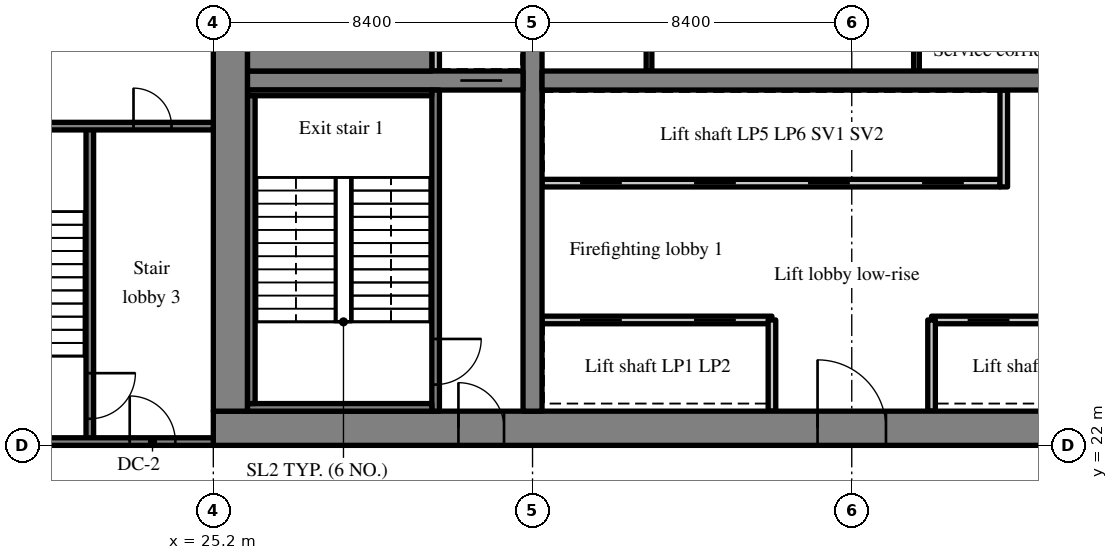
"""IFC4 building model, lengths in metres.
Left out: names, types, materials, properties, quantities, classifications, styles, units other than length and angle.
Written with IfcOpenShell. Run it as: python <this file> out.ifc"""

import sys

from ifc_helpers import new_model, si_unit, direction, frame, frame_2d, origin, place, context, subcontext, project, spatial, rectangle, extrude, source, transform, mapped, element, fill, save


model = new_model("IFC4")
c1 = context("Model", 3, precision=1e-05, world=origin(), true_north=direction((0.0, 1.0)))
c2 = subcontext(c1, "Body", "Model", "MODEL_VIEW")
j1 = project(units=[si_unit("LENGTHUNIT", "METRE"), si_unit("PLANEANGLEUNIT", "RADIAN")], contexts=[c1])
p1 = place(None, origin())
s1 = spatial("IfcSite", under=j1, at=p1, CompositionType="ELEMENT")
p2 = place(p1, origin())
s2 = spatial("IfcBuilding", under=s1, at=p2, CompositionType="ELEMENT")
p3 = place(p2, frame((0.0, 0.0, 114.2)))
s3 = spatial("IfcBuildingStorey", under=s2, at=p3, CompositionType="ELEMENT", Elevation=114.2)
m1 = source(origin(), c2, "Body", "SweptSolid", [
    extrude(rectangle(XDim=50.4, YDim=0.9, at=frame_2d((25.2, 0.0))), origin(), (0.0, 0.0, 1.0), 3.52),
])
p4 = place(p3, frame((25.2, 22.45, 0.0), z_axis=(0.0, 0.0, 1.0), x_axis=(1.0, 0.0, 0.0)))
e1 = element("IfcWall", 1, at=p4, inside=s3, PredefinedType="SHEAR", context=c2, shape_type="MappedRepresentation", body=[
    mapped(m1, transform((0.0, 0.0, 0.0), scale=1.0)),
])
m2 = source(origin(), c2, "Body", "SweptSolid", [
    extrude(rectangle(XDim=1.8, YDim=2.1, at=frame_2d((0.9, 1.05))), frame((0.0, 0.46, 0.0), z_axis=(0.0, -1.0, 0.0), x_axis=(1.0, 0.0, 0.0)), (0.0, 0.0, 1.0), 0.92),
])
p5 = place(p4, frame((15.9, 0.0, 0.0)))
e2 = element("IfcOpeningElement", 2, at=p5, cuts=e1, PredefinedType="OPENING", context=c2, shape_type="MappedRepresentation", body=[
    mapped(m2, transform((0.0, 0.0, 0.0), scale=1.0)),
])
m3 = source(origin(), c2, "Body", "SweptSolid", [
    extrude(rectangle(XDim=1.2, YDim=2.1, at=frame_2d((0.6, 1.05))), frame((0.0, 0.46, 0.0), z_axis=(0.0, -1.0, 0.0), x_axis=(1.0, 0.0, 0.0)), (0.0, 0.0, 1.0), 0.92),
])
p6 = place(p4, frame((26.975, 0.0, 0.0)))
e3 = element("IfcOpeningElement", 3, at=p6, cuts=e1, PredefinedType="OPENING", context=c2, shape_type="MappedRepresentation", body=[
    mapped(m3, transform((0.0, 0.0, 0.0), scale=1.0)),
])
m4 = source(origin(), c2, "Body", "SweptSolid", [
    extrude(rectangle(XDim=0.9, YDim=2.1, at=frame_2d((0.45, 1.05))), frame((0.0, 0.46, 0.0), z_axis=(0.0, -1.0, 0.0), x_axis=(1.0, 0.0, 0.0)), (0.0, 0.0, 1.0), 0.92),
])
p7 = place(p4, frame((33.75, 0.0, 0.0)))
e4 = element("IfcOpeningElement", 4, at=p7, cuts=e1, PredefinedType="OPENING", context=c2, shape_type="MappedRepresentation", body=[
    mapped(m4, transform((0.0, 0.0, 0.0), scale=1.0)),
])
p8 = place(p4, frame((30.75, 0.0, 0.0)))
e5 = element("IfcOpeningElement", 5, at=p8, cuts=e1, PredefinedType="OPENING", context=c2, shape_type="MappedRepresentation", body=[
    mapped(m4, transform((0.0, 0.0, 0.0), scale=1.0)),
])
p9 = place(p4, frame((39.788, 0.0, 0.0)))
e6 = element("IfcOpeningElement", 6, at=p9, cuts=e1, PredefinedType="OPENING", context=c2, shape_type="MappedRepresentation", body=[
    mapped(m4, transform((0.0, 0.0, 0.0), scale=1.0)),
])
p10 = place(p4, frame((36.762, 0.0, 0.0)))
e7 = element("IfcOpeningElement", 7, at=p10, cuts=e1, PredefinedType="OPENING", context=c2, shape_type="MappedRepresentation", body=[
    mapped(m4, transform((0.0, 0.0, 0.0), scale=1.0)),
])
p11 = place(p4, frame((6.45, 0.0, 0.0)))
e8 = element("IfcOpeningElement", 8, at=p11, cuts=e1, PredefinedType="OPENING", context=c2, shape_type="MappedRepresentation", body=[
    mapped(m3, transform((0.0, 0.0, 0.0), scale=1.0)),
])
p12 = place(p4, frame((47.775, 0.0, 0.0)))
e9 = element("IfcOpeningElement", 9, at=p12, cuts=e1, PredefinedType="OPENING", context=c2, shape_type="MappedRepresentation", body=[
    mapped(m3, transform((0.0, 0.0, 0.0), scale=1.0)),
])
m5 = source(origin(), c2, "Body", "SweptSolid", [
    extrude(rectangle(XDim=18.2, YDim=0.9, at=frame_2d((9.1, 0.0))), origin(), (0.0, 0.0, 1.0), 3.52),
])
p13 = place(p3, frame((25.65, 22.9, 0.0), z_axis=(0.0, 0.0, 1.0), x_axis=(0.0, 1.0, 0.0)))
e10 = element("IfcWall", 10, at=p13, inside=s3, PredefinedType="SHEAR", context=c2, shape_type="MappedRepresentation", body=[
    mapped(m5, transform((0.0, 0.0, 0.0), scale=1.0)),
])
m6 = source(origin(), c2, "Body", "SweptSolid", [
    extrude(rectangle(XDim=18.2, YDim=0.5, at=frame_2d((9.1, 0.0))), origin(), (0.0, 0.0, 1.0), 3.52),
])
p14 = place(p3, frame((33.6, 22.9, 0.0), z_axis=(0.0, 0.0, 1.0), x_axis=(0.0, 1.0, 0.0)))
e11 = element("IfcWall", 11, at=p14, inside=s3, PredefinedType="SHEAR", context=c2, shape_type="MappedRepresentation", body=[
    mapped(m6, transform((0.0, 0.0, 0.0), scale=1.0)),
])
m7 = source(origin(), c2, "Body", "SweptSolid", [
    extrude(rectangle(XDim=1.1, YDim=2.1, at=frame_2d((0.55, 1.05))), frame((0.0, 0.26, 0.0), z_axis=(0.0, -1.0, 0.0), x_axis=(1.0, 0.0, 0.0)), (0.0, 0.0, 1.0), 0.52),
])
p15 = place(p14, frame((12.55, 0.0, 0.0)))
e12 = element("IfcOpeningElement", 12, at=p15, cuts=e11, PredefinedType="OPENING", context=c2, shape_type="MappedRepresentation", body=[
    mapped(m7, transform((0.0, 0.0, 0.0), scale=1.0)),
])
m8 = source(origin(), c2, "Body", "SweptSolid", [
    extrude(rectangle(XDim=7.25, YDim=0.5, at=frame_2d((3.625, 0.0))), origin(), (0.0, 0.0, 1.0), 3.52),
])
p16 = place(p3, frame((26.1, 31.6, 0.0), z_axis=(0.0, 0.0, 1.0), x_axis=(1.0, 0.0, 0.0)))
e13 = element("IfcWall", 13, at=p16, inside=s3, PredefinedType="SHEAR", context=c2, shape_type="MappedRepresentation", body=[
    mapped(m8, transform((0.0, 0.0, 0.0), scale=1.0)),
])
p17 = place(p16, frame((5.6, 0.0, 0.0)))
e14 = element("IfcOpeningElement", 14, at=p17, cuts=e13, PredefinedType="OPENING", context=c2, shape_type="MappedRepresentation", body=[
    mapped(m7, transform((0.0, 0.0, 0.0), scale=1.0)),
])
m9 = source(origin(), c2, "Body", "SweptSolid", [
    extrude(rectangle(XDim=16.3, YDim=0.5, at=frame_2d((8.15, 0.0))), origin(), (0.0, 0.0, 1.0), 3.52),
])
p18 = place(p3, frame((33.85, 31.6, 0.0), z_axis=(0.0, 0.0, 1.0), x_axis=(1.0, 0.0, 0.0)))
e15 = element("IfcWall", 15, at=p18, inside=s3, PredefinedType="SHEAR", context=c2, shape_type="MappedRepresentation", body=[
    mapped(m9, transform((0.0, 0.0, 0.0), scale=1.0)),
])
m10 = source(origin(), c2, "Body", "SweptSolid", [
    extrude(rectangle(XDim=1.0, YDim=2.1, at=frame_2d((0.5, 1.05))), frame((0.0, 0.26, 0.0), z_axis=(0.0, -1.0, 0.0), x_axis=(1.0, 0.0, 0.0)), (0.0, 0.0, 1.0), 0.52),
])
p19 = place(p18, frame((14.725, 0.0, 0.0)))
e16 = element("IfcOpeningElement", 16, at=p19, cuts=e15, PredefinedType="OPENING", context=c2, shape_type="MappedRepresentation", body=[
    mapped(m10, transform((0.0, 0.0, 0.0), scale=1.0)),
])
m11 = source(origin(), c2, "Body", "SweptSolid", [
    extrude(rectangle(XDim=6.05, YDim=0.2, at=frame_2d((3.025, 0.0))), origin(), (0.0, 0.0, 1.0), 3.52),
])
p20 = place(p3, frame((33.85, 25.3, 0.0), z_axis=(0.0, 0.0, 1.0), x_axis=(1.0, 0.0, 0.0)))
e17 = element("IfcWall", 17, at=p20, inside=s3, PredefinedType="SOLIDWALL", context=c2, shape_type="MappedRepresentation", body=[
    mapped(m11, transform((0.0, 0.0, 0.0), scale=1.0)),
])
m12 = source(origin(), c2, "Body", "SweptSolid", [
    extrude(rectangle(XDim=1.1, YDim=2.1, at=frame_2d((0.55, 1.05))), frame((0.0, 0.11, 0.0), z_axis=(0.0, -1.0, 0.0), x_axis=(1.0, 0.0, 0.0)), (0.0, 0.0, 1.0), 0.22),
])
p21 = place(p20, frame((1.0, 0.0, 0.0)))
e18 = element("IfcOpeningElement", 18, at=p21, cuts=e17, PredefinedType="OPENING", context=c2, shape_type="MappedRepresentation", body=[
    mapped(m12, transform((0.0, 0.0, 0.0), scale=1.0)),
])
p22 = place(p20, frame((4.0, 0.0, 0.0)))
e19 = element("IfcOpeningElement", 19, at=p22, cuts=e17, PredefinedType="OPENING", context=c2, shape_type="MappedRepresentation", body=[
    mapped(m12, transform((0.0, 0.0, 0.0), scale=1.0)),
])
m13 = source(origin(), c2, "Body", "SweptSolid", [
    extrude(rectangle(XDim=6.0, YDim=0.2, at=frame_2d((3.0, 0.0))), origin(), (0.0, 0.0, 1.0), 3.52),
])
p23 = place(p3, frame((44.1, 25.3, 0.0), z_axis=(0.0, 0.0, 1.0), x_axis=(1.0, 0.0, 0.0)))
e20 = element("IfcWall", 20, at=p23, inside=s3, PredefinedType="SOLIDWALL", context=c2, shape_type="MappedRepresentation", body=[
    mapped(m13, transform((0.0, 0.0, 0.0), scale=1.0)),
])
p24 = place(p23, frame((0.95, 0.0, 0.0)))
e21 = element("IfcOpeningElement", 21, at=p24, cuts=e20, PredefinedType="OPENING", context=c2, shape_type="MappedRepresentation", body=[
    mapped(m12, transform((0.0, 0.0, 0.0), scale=1.0)),
])
p25 = place(p23, frame((3.95, 0.0, 0.0)))
e22 = element("IfcOpeningElement", 22, at=p25, cuts=e20, PredefinedType="OPENING", context=c2, shape_type="MappedRepresentation", body=[
    mapped(m12, transform((0.0, 0.0, 0.0), scale=1.0)),
])
m14 = source(origin(), c2, "Body", "SweptSolid", [
    extrude(rectangle(XDim=12.05, YDim=0.2, at=frame_2d((6.025, 0.0))), origin(), (0.0, 0.0, 1.0), 3.52),
])
p26 = place(p3, frame((33.85, 28.9, 0.0), z_axis=(0.0, 0.0, 1.0), x_axis=(1.0, 0.0, 0.0)))
e23 = element("IfcWall", 23, at=p26, inside=s3, PredefinedType="SOLIDWALL", context=c2, shape_type="MappedRepresentation", body=[
    mapped(m14, transform((0.0, 0.0, 0.0), scale=1.0)),
])
p27 = place(p26, frame((1.0, 0.0, 0.0)))
e24 = element("IfcOpeningElement", 24, at=p27, cuts=e23, PredefinedType="OPENING", context=c2, shape_type="MappedRepresentation", body=[
    mapped(m12, transform((0.0, 0.0, 0.0), scale=1.0)),
])
p28 = place(p26, frame((4.0, 0.0, 0.0)))
e25 = element("IfcOpeningElement", 25, at=p28, cuts=e23, PredefinedType="OPENING", context=c2, shape_type="MappedRepresentation", body=[
    mapped(m12, transform((0.0, 0.0, 0.0), scale=1.0)),
])
p29 = place(p26, frame((7.0, 0.0, 0.0)))
e26 = element("IfcOpeningElement", 26, at=p29, cuts=e23, PredefinedType="OPENING", context=c2, shape_type="MappedRepresentation", body=[
    mapped(m12, transform((0.0, 0.0, 0.0), scale=1.0)),
])
p30 = place(p26, frame((10.0, 0.0, 0.0)))
e27 = element("IfcOpeningElement", 27, at=p30, cuts=e23, PredefinedType="OPENING", context=c2, shape_type="MappedRepresentation", body=[
    mapped(m12, transform((0.0, 0.0, 0.0), scale=1.0)),
])
m15 = source(origin(), c2, "Body", "SweptSolid", [
    extrude(rectangle(XDim=2.4, YDim=0.2, at=frame_2d((1.2, 0.0))), origin(), (0.0, 0.0, 1.0), 3.52),
])
for number, where, z_axis, x_axis in (
    (28, (39.9, 22.9, 0.0), (0.0, 0.0, 1.0), (0.0, 1.0, 0.0)),
    (29, (44.1, 22.9, 0.0), (0.0, 0.0, 1.0), (0.0, 1.0, 0.0)),
):
    element("IfcWall", number, at=place(p3, frame(where, z_axis=z_axis, x_axis=x_axis)), inside=s3, PredefinedType="SOLIDWALL", context=c2, shape_type="MappedRepresentation", body=[
        mapped(m15, transform((0.0, 0.0, 0.0), scale=1.0)),
    ])
m16 = source(origin(), c2, "Body", "SweptSolid", [
    extrude(rectangle(XDim=2.55, YDim=0.2, at=frame_2d((1.275, 0.0))), origin(), (0.0, 0.0, 1.0), 3.52),
])
p31 = place(p3, frame((46.0, 28.8, 0.0), z_axis=(0.0, 0.0, 1.0), x_axis=(0.0, 1.0, 0.0)))
e30 = element("IfcWall", 30, at=p31, inside=s3, PredefinedType="SOLIDWALL", context=c2, shape_type="MappedRepresentation", body=[
    mapped(m16, transform((0.0, 0.0, 0.0), scale=1.0)),
])
m17 = source(origin(), c2, "Body", "SweptSolid", [
    extrude(rectangle(XDim=3.15, YDim=0.15, at=frame_2d((1.575, 0.0))), origin(), (0.0, 0.0, 1.0), 3.52),
])
for number, where, z_axis, x_axis in (
    (31, (36.665, 31.85, 0.0), (0.0, 0.0, 1.0), (0.0, 1.0, 0.0)),
    (32, (43.703, 31.85, 0.0), (0.0, 0.0, 1.0), (0.0, 1.0, 0.0)),
):
    element("IfcWall", number, at=place(p3, frame(where, z_axis=z_axis, x_axis=x_axis)), inside=s3, PredefinedType="PARTITIONING", context=c2, shape_type="MappedRepresentation", body=[
        mapped(m17, transform((0.0, 0.0, 0.0), scale=1.0)),
    ])
m18 = source(origin(), c2, "Body", "SweptSolid", [
    extrude(rectangle(XDim=8.45, YDim=0.2, at=frame_2d((4.225, 0.0))), origin(), (0.0, 0.0, 1.0), 3.52),
])
p32 = place(p3, frame((31.05, 22.9, 0.0), z_axis=(0.0, 0.0, 1.0), x_axis=(0.0, 1.0, 0.0)))
e33 = element("IfcWall", 33, at=p32, inside=s3, PredefinedType="SOLIDWALL", context=c2, shape_type="MappedRepresentation", body=[
    mapped(m18, transform((0.0, 0.0, 0.0), scale=1.0)),
])
m19 = source(origin(), c2, "Body", "SweptSolid", [
    extrude(rectangle(XDim=1.2, YDim=2.1, at=frame_2d((0.6, 1.05))), frame((0.0, 0.11, 0.0), z_axis=(0.0, -1.0, 0.0), x_axis=(1.0, 0.0, 0.0)), (0.0, 0.0, 1.0), 0.22),
])
p33 = place(p32, frame((0.7, 0.0, 0.0)))
e34 = element("IfcOpeningElement", 34, at=p33, cuts=e33, PredefinedType="OPENING", context=c2, shape_type="MappedRepresentation", body=[
    mapped(m19, transform((0.0, 0.0, 0.0), scale=1.0)),
])
m20 = source(origin(), c2, "Body", "SweptSolid", [
    extrude(rectangle(XDim=1.75, YDim=0.2, at=frame_2d((0.875, 0.0))), origin(), (0.0, 0.0, 1.0), 3.52),
])
p34 = place(p3, frame((31.05, 31.85, 0.0), z_axis=(0.0, 0.0, 1.0), x_axis=(0.0, 1.0, 0.0)))
e35 = element("IfcWall", 35, at=p34, inside=s3, PredefinedType="SOLIDWALL", context=c2, shape_type="MappedRepresentation", body=[
    mapped(m20, transform((0.0, 0.0, 0.0), scale=1.0)),
])
m21 = source(origin(), c2, "Body", "SweptSolid", [
    extrude(rectangle(XDim=8.3, YDim=0.2, at=frame_2d((4.15, 0.0))), origin(), (0.0, 0.0, 1.0), 3.52),
])
p35 = place(p3, frame((21.95, 22.1, 0.0), z_axis=(0.0, 0.0, 1.0), x_axis=(0.0, 1.0, 0.0)))
e36 = element("IfcWall", 36, at=p35, inside=s3, PredefinedType="SOLIDWALL", context=c2, shape_type="MappedRepresentation", body=[
    mapped(m21, transform((0.0, 0.0, 0.0), scale=1.0)),
])
p36 = place(p35, frame((0.6, 0.0, 0.0)))
e37 = element("IfcOpeningElement", 37, at=p36, cuts=e36, PredefinedType="OPENING", context=c2, shape_type="MappedRepresentation", body=[
    mapped(m19, transform((0.0, 0.0, 0.0), scale=1.0)),
])
m22 = source(origin(), c2, "Body", "SweptSolid", [
    extrude(rectangle(XDim=8.225, YDim=0.2, at=frame_2d((4.112, 0.0))), origin(), (0.0, 0.0, 1.0), 3.52),
])
p37 = place(p3, frame((16.975, 22.1, 0.0), z_axis=(0.0, 0.0, 1.0), x_axis=(1.0, 0.0, 0.0)))
e38 = element("IfcWall", 38, at=p37, inside=s3, PredefinedType="SOLIDWALL", context=c2, shape_type="MappedRepresentation", body=[
    mapped(m22, transform((0.0, 0.0, 0.0), scale=1.0)),
])
p38 = place(p37, frame((6.025, 0.0, 0.0)))
e39 = element("IfcOpeningElement", 39, at=p38, cuts=e38, PredefinedType="OPENING", context=c2, shape_type="MappedRepresentation", body=[
    mapped(m19, transform((0.0, 0.0, 0.0), scale=1.0)),
])
p39 = place(p3, frame((16.975, 30.4, 0.0), z_axis=(0.0, 0.0, 1.0), x_axis=(1.0, 0.0, 0.0)))
e40 = element("IfcWall", 40, at=p39, inside=s3, PredefinedType="SOLIDWALL", context=c2, shape_type="MappedRepresentation", body=[
    mapped(m22, transform((0.0, 0.0, 0.0), scale=1.0)),
])
m23 = source(origin(), c2, "Body", "SweptSolid", [
    extrude(rectangle(XDim=1.0, YDim=2.1, at=frame_2d((0.5, 1.05))), frame((0.0, 0.11, 0.0), z_axis=(0.0, -1.0, 0.0), x_axis=(1.0, 0.0, 0.0)), (0.0, 0.0, 1.0), 0.22),
])
p40 = place(p39, frame((6.125, 0.0, 0.0)))
e41 = element("IfcOpeningElement", 41, at=p40, cuts=e40, PredefinedType="OPENING", context=c2, shape_type="MappedRepresentation", body=[
    mapped(m23, transform((0.0, 0.0, 0.0), scale=1.0)),
])
m24 = source(origin(), c2, "Body", "SweptSolid", [
    extrude(rectangle(XDim=4.85, YDim=0.2, at=frame_2d((2.425, 0.0))), origin(), (0.0, 0.0, 1.0), 3.52),
])
p41 = place(p3, frame((26.1, 23.0, 0.0), z_axis=(0.0, 0.0, 1.0), x_axis=(1.0, 0.0, 0.0)))
e42 = element("IfcWall", 42, at=p41, inside=s3, PredefinedType="SOLIDWALL", context=c2, shape_type="MappedRepresentation", body=[
    mapped(m24, transform((0.0, 0.0, 0.0), scale=1.0)),
])
m25 = source(origin(), c2, "Body", "SweptSolid", [
    extrude(rectangle(XDim=4.85, YDim=0.15, at=frame_2d((2.425, 0.0))), origin(), (0.0, 0.0, 1.0), 3.52),
])
p42 = place(p3, frame((26.1, 31.275, 0.0), z_axis=(0.0, 0.0, 1.0), x_axis=(1.0, 0.0, 0.0)))
e43 = element("IfcWall", 43, at=p42, inside=s3, PredefinedType="SOLIDWALL", context=c2, shape_type="MappedRepresentation", body=[
    mapped(m25, transform((0.0, 0.0, 0.0), scale=1.0)),
])
m26 = source(origin(), c2, "Body", "SweptSolid", [
    extrude(rectangle(XDim=8.1, YDim=0.2, at=frame_2d((4.05, 0.0))), origin(), (0.0, 0.0, 1.0), 3.52),
])
p43 = place(p3, frame((26.2, 23.1, 0.0), z_axis=(0.0, 0.0, 1.0), x_axis=(0.0, 1.0, 0.0)))
e44 = element("IfcWall", 44, at=p43, inside=s3, PredefinedType="SOLIDWALL", context=c2, shape_type="MappedRepresentation", body=[
    mapped(m26, transform((0.0, 0.0, 0.0), scale=1.0)),
])
m27 = source(origin(), c2, "Body", "SweptSolid", [
    extrude(rectangle(XDim=4.85, YDim=0.95, at=frame_2d((2.425, 0.0))), origin(), (0.0, 0.0, 1.0), 3.52),
])
p44 = place(p3, frame((26.1, 32.325, 0.0), z_axis=(0.0, 0.0, 1.0), x_axis=(1.0, 0.0, 0.0)))
e45 = element("IfcWall", 45, at=p44, inside=s3, PredefinedType="SOLIDWALL", context=c2, shape_type="MappedRepresentation", body=[
    mapped(m27, transform((0.0, 0.0, 0.0), scale=1.0)),
])
m28 = source(origin(), c2, "Body", "SweptSolid", [
    extrude(rectangle(XDim=1.8, YDim=2.1, at=frame_2d((0.9, 1.05))), frame((0.0, 0.375, 0.0), z_axis=(0.0, -1.0, 0.0), x_axis=(1.0, 0.0, 0.0)), (0.0, 0.0, 1.0), 0.05),
])
p45 = place(p5, origin())
e46 = element("IfcDoor", 46, at=p45, inside=s3, OperationType="DOUBLE_DOOR_SINGLE_SWING", PredefinedType="DOOR", context=c2, shape_type="MappedRepresentation", body=[
    mapped(m28, transform((0.0, 0.0, 0.0), scale=1.0)),
])
fill(e2, e46)
m29 = source(origin(), c2, "Body", "SweptSolid", [
    extrude(rectangle(XDim=1.1, YDim=2.1, at=frame_2d((0.55, 1.05))), frame((0.0, 0.025, 0.0), z_axis=(0.0, -1.0, 0.0), x_axis=(1.0, 0.0, 0.0)), (0.0, 0.0, 1.0), 0.05),
])
p46 = place(p21, origin())
e47 = element("IfcDoor", 47, at=p46, inside=s3, OperationType="SLIDING_TO_LEFT", PredefinedType="DOOR", context=c2, shape_type="MappedRepresentation", body=[
    mapped(m29, transform((0.0, 0.0, 0.0), scale=1.0)),
])
fill(e18, e47)
p47 = place(p22, origin())
e48 = element("IfcDoor", 48, at=p47, inside=s3, OperationType="SLIDING_TO_RIGHT", PredefinedType="DOOR", context=c2, shape_type="MappedRepresentation", body=[
    mapped(m29, transform((0.0, 0.0, 0.0), scale=1.0)),
])
fill(e19, e48)
p48 = place(p24, origin())
e49 = element("IfcDoor", 49, at=p48, inside=s3, OperationType="SLIDING_TO_LEFT", PredefinedType="DOOR", context=c2, shape_type="MappedRepresentation", body=[
    mapped(m29, transform((0.0, 0.0, 0.0), scale=1.0)),
])
fill(e21, e49)
p49 = place(p27, origin())
e50 = element("IfcDoor", 50, at=p49, inside=s3, OperationType="SLIDING_TO_LEFT", PredefinedType="DOOR", context=c2, shape_type="MappedRepresentation", body=[
    mapped(m29, transform((0.0, 0.0, 0.0), scale=1.0)),
])
fill(e24, e50)
p50 = place(p28, origin())
e51 = element("IfcDoor", 51, at=p50, inside=s3, OperationType="SLIDING_TO_RIGHT", PredefinedType="DOOR", context=c2, shape_type="MappedRepresentation", body=[
    mapped(m29, transform((0.0, 0.0, 0.0), scale=1.0)),
])
fill(e25, e51)
p51 = place(p29, origin())
e52 = element("IfcDoor", 52, at=p51, inside=s3, OperationType="SLIDING_TO_LEFT", PredefinedType="DOOR", context=c2, shape_type="MappedRepresentation", body=[
    mapped(m29, transform((0.0, 0.0, 0.0), scale=1.0)),
])
fill(e26, e52)
p52 = place(p30, origin())
e53 = element("IfcDoor", 53, at=p52, inside=s3, OperationType="SLIDING_TO_RIGHT", PredefinedType="DOOR", context=c2, shape_type="MappedRepresentation", body=[
    mapped(m29, transform((0.0, 0.0, 0.0), scale=1.0)),
])
fill(e27, e53)
m30 = source(origin(), c2, "Body", "SweptSolid", [
    extrude(rectangle(XDim=1.2, YDim=2.1, at=frame_2d((0.6, 1.05))), frame((0.0, 0.025, 0.0), z_axis=(0.0, -1.0, 0.0), x_axis=(1.0, 0.0, 0.0)), (0.0, 0.0, 1.0), 0.05),
])
p53 = place(p33, origin())
e54 = element("IfcDoor", 54, at=p53, inside=s3, OperationType="SINGLE_SWING_RIGHT", PredefinedType="DOOR", context=c2, shape_type="MappedRepresentation", body=[
    mapped(m30, transform((0.0, 0.0, 0.0), scale=1.0)),
])
fill(e34, e54)
m31 = source(origin(), c2, "Body", "SweptSolid", [
    extrude(rectangle(XDim=1.2, YDim=2.1, at=frame_2d((0.6, 1.05))), frame((0.0, 0.375, 0.0), z_axis=(0.0, -1.0, 0.0), x_axis=(1.0, 0.0, 0.0)), (0.0, 0.0, 1.0), 0.05),
])
p54 = place(p11, origin())
e55 = element("IfcDoor", 55, at=p54, inside=s3, OperationType="SINGLE_SWING_LEFT", PredefinedType="DOOR", context=c2, shape_type="MappedRepresentation", body=[
    mapped(m31, transform((0.0, 0.0, 0.0), scale=1.0)),
])
fill(e8, e55)
p55 = place(p17, origin())
e56 = element("IfcDoor", 56, at=p55, inside=s3, OperationType="SLIDING_TO_RIGHT", PredefinedType="DOOR", context=c2, shape_type="MappedRepresentation", body=[
    mapped(m29, transform((0.0, 0.0, 0.0), scale=1.0)),
])
fill(e14, e56)
p56 = place(p36, origin())
e57 = element("IfcDoor", 57, at=p56, inside=s3, OperationType="SINGLE_SWING_RIGHT", PredefinedType="DOOR", context=c2, shape_type="MappedRepresentation", body=[
    mapped(m30, transform((0.0, 0.0, 0.0), scale=1.0)),
])
fill(e37, e57)
p57 = place(p38, origin())
e58 = element("IfcDoor", 58, at=p57, inside=s3, OperationType="SINGLE_SWING_LEFT", PredefinedType="DOOR", context=c2, shape_type="MappedRepresentation", body=[
    mapped(m30, transform((0.0, 0.0, 0.0), scale=1.0)),
])
fill(e39, e58)
m32 = source(origin(), c2, "Body", "SweptSolid", [
    extrude(rectangle(XDim=1.0, YDim=2.1, at=frame_2d((0.5, 1.05))), frame((0.0, 0.025, 0.0), z_axis=(0.0, -1.0, 0.0), x_axis=(1.0, 0.0, 0.0)), (0.0, 0.0, 1.0), 0.05),
])
p58 = place(p40, origin())
e59 = element("IfcDoor", 59, at=p58, inside=s3, OperationType="SINGLE_SWING_LEFT", PredefinedType="DOOR", context=c2, shape_type="MappedRepresentation", body=[
    mapped(m32, transform((0.0, 0.0, 0.0), scale=1.0)),
])
fill(e41, e59)
save(model, sys.argv[1])
